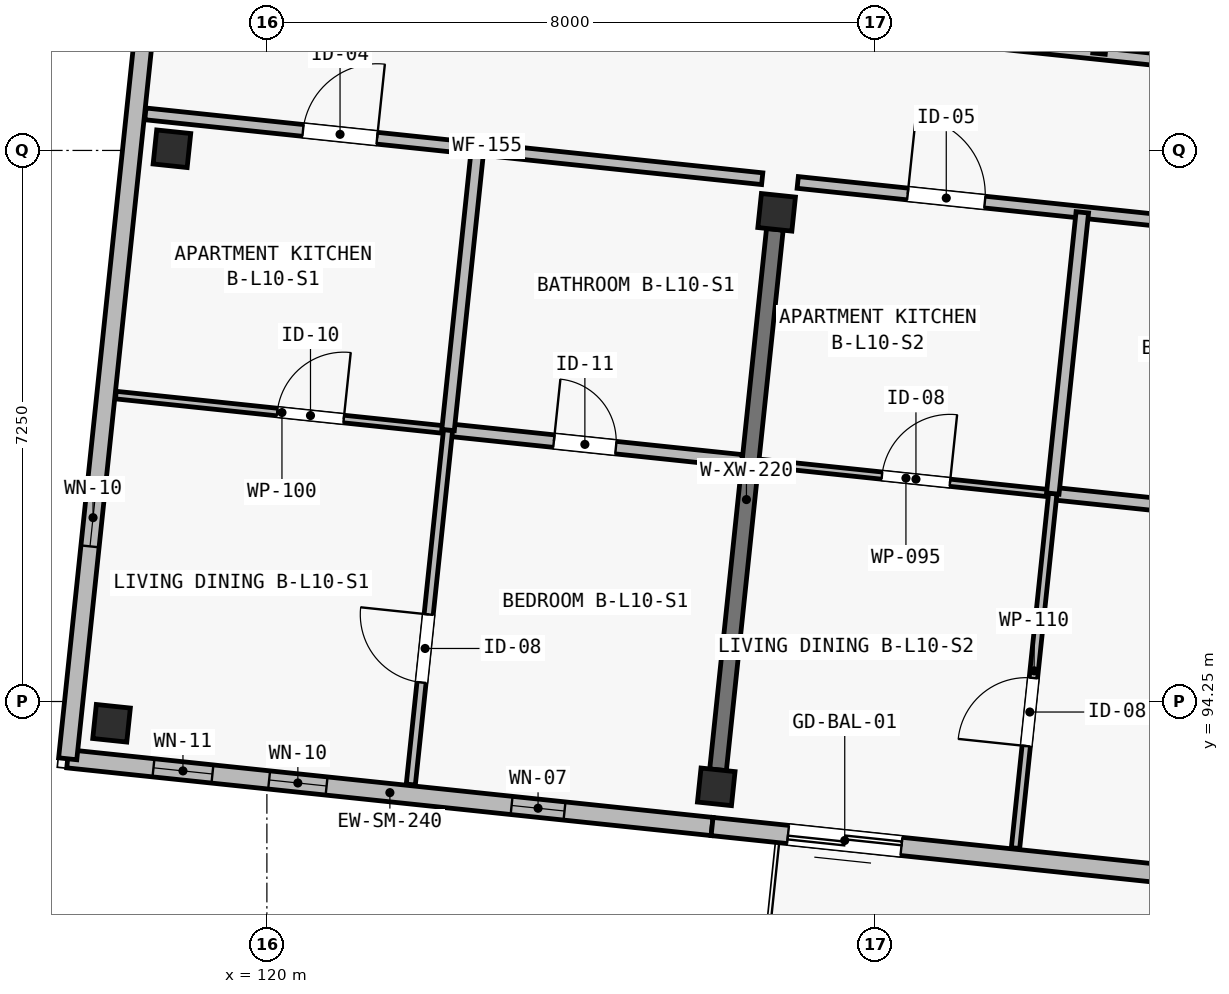
"""IFC4 building model, lengths in metres.
Left out: names, types, materials, properties, quantities, classifications, styles, units other than length and angle.
Written with IfcOpenShell. Run it as: python <this file> out.ifc"""

import sys

from ifc_helpers import new_model, si_unit, direction, frame, frame_2d, origin, origin_2d, place, context, subcontext, project, spatial, polyline, rectangle, outline, extrude, element, fill, save


model = new_model("IFC4")
c1 = context("Model", 3, precision=1e-05, world=origin(), true_north=direction((0.0, 1.0)))
c2 = subcontext(c1, "Body", "Model", "MODEL_VIEW")
j1 = project(units=[si_unit("LENGTHUNIT", "METRE"), si_unit("PLANEANGLEUNIT", "RADIAN")], contexts=[c1])
p1 = place(None, origin())
s1 = spatial("IfcSite", under=j1, at=p1, CompositionType="ELEMENT")
p2 = place(p1, origin())
s2 = spatial("IfcBuilding", under=s1, at=p2, CompositionType="ELEMENT")
p3 = place(p2, frame((0.0, 0.0, 34.4)))
s3 = spatial("IfcBuildingStorey", under=s2, at=p3, CompositionType="ELEMENT", Elevation=34.4)
for number, where, z_axis, x_axis in (
    (1, (117.956, 93.964, 0.0), (0.0, 0.0, 1.0), (0.995, -0.105, 0.0)),
    (2, (118.75, 101.522, 0.0), (0.0, 0.0, 1.0), (0.995, -0.105, 0.0)),
    (3, (125.912, 93.127, 0.0), (0.0, 0.0, 1.0), (0.995, -0.105, 0.0)),
    (4, (126.707, 100.686, 0.0), (0.0, 0.0, 1.0), (0.995, -0.105, 0.0)),
):
    element("IfcColumn", number, at=place(p3, frame(where, z_axis=z_axis, x_axis=x_axis)), inside=s3, PredefinedType="COLUMN", context=c2, shape_type="SweptSolid", body=[
        extrude(rectangle(XDim=0.45, YDim=0.45, at=origin_2d()), origin(), (0.0, 0.0, 1.0), 3.25),
    ])
p4 = place(p3, frame((125.936, 93.351, 0.0), z_axis=(0.0, 0.0, 1.0), x_axis=(0.104553253602, 0.994519289487, 0.0)))
e5 = element("IfcWall", 5, at=p4, inside=s3, PredefinedType="SHEAR", context=c2, shape_type="SweptSolid", body=[
    extrude(rectangle(XDim=7.15, YDim=0.22, at=frame_2d((3.575, 0.0))), origin(), (0.0, 0.0, 1.0), 2.5),
])
p5 = place(p3, frame((125.857, 92.605, 0.0), z_axis=(0.0, 0.0, 1.0), x_axis=(-0.994521760736, 0.104529744196, 0.0)))
e6 = element("IfcWall", 6, at=p5, inside=s3, PredefinedType="SOLIDWALL", context=c2, shape_type="SweptSolid", body=[
    extrude(outline(polyline([(0.0, 0.0), (8.525, 0.0), (8.525, 3.319), (0.0, 4.901), (0.0, 0.0)])), frame((0.0, 0.12, 0.0), z_axis=(0.0, -1.0, 0.0), x_axis=(1.0, 0.0, 0.0)), (0.0, 0.0, 1.0), 0.24),
])
p6 = place(p5, frame((1.952, 0.0, 0.52)))
e7 = element("IfcOpeningElement", 7, at=p6, cuts=e6, PredefinedType="OPENING", context=c2, shape_type="SweptSolid", body=[
    extrude(rectangle(XDim=0.7, YDim=2.36, at=frame_2d((0.35, 1.18))), frame((0.0, 0.135, 0.0), z_axis=(0.0, -1.0, 0.0), x_axis=(1.0, 0.0, 0.0)), (0.0, 0.0, 1.0), 0.27),
])
p7 = place(p5, frame((5.1, 0.0, 0.52)))
e8 = element("IfcOpeningElement", 8, at=p7, cuts=e6, PredefinedType="OPENING", context=c2, shape_type="SweptSolid", body=[
    extrude(rectangle(XDim=0.76, YDim=2.34, at=frame_2d((0.38, 1.17))), frame((0.0, 0.135, 0.0), z_axis=(0.0, -1.0, 0.0), x_axis=(1.0, 0.0, 0.0)), (0.0, 0.0, 1.0), 0.27),
])
p8 = place(p5, frame((6.61, 0.0, 0.42)))
e9 = element("IfcOpeningElement", 9, at=p8, cuts=e6, PredefinedType="OPENING", context=c2, shape_type="SweptSolid", body=[
    extrude(rectangle(XDim=0.78, YDim=2.2, at=frame_2d((0.39, 1.1))), frame((0.0, 0.135, 0.0), z_axis=(0.0, -1.0, 0.0), x_axis=(1.0, 0.0, 0.0)), (0.0, 0.0, 1.0), 0.27),
])
p9 = place(p3, frame((133.292, 91.824, 0.0), z_axis=(0.0, 0.0, 1.0), x_axis=(-0.994519939392, 0.104547071461, 0.0)))
e10 = element("IfcWall", 10, at=p9, inside=s3, PredefinedType="SOLIDWALL", context=c2, shape_type="SweptSolid", body=[
    extrude(outline(polyline([(0.0, 0.0), (7.475, 0.0), (7.475, 4.901), (0.0, 6.288), (0.0, 0.0)])), frame((0.0, 0.12, 0.0), z_axis=(0.0, -1.0, 0.0), x_axis=(1.0, 0.0, 0.0)), (0.0, 0.0, 1.0), 0.24),
])
p10 = place(p9, frame((4.97, 0.0, 0.0)))
e11 = element("IfcOpeningElement", 11, at=p10, cuts=e10, PredefinedType="OPENING", context=c2, shape_type="SweptSolid", body=[
    extrude(rectangle(XDim=1.5, YDim=2.12, at=frame_2d((0.75, 1.06))), frame((0.0, 0.135, 0.0), z_axis=(0.0, -1.0, 0.0), x_axis=(1.0, 0.0, 0.0)), (0.0, 0.0, 1.0), 0.27),
])
p11 = place(p9, frame((0.305, 0.0, 0.42)))
e12 = element("IfcOpeningElement", 12, at=p11, cuts=e10, PredefinedType="OPENING", context=c2, shape_type="SweptSolid", body=[
    extrude(rectangle(XDim=0.62, YDim=2.28, at=frame_2d((0.31, 1.14))), frame((0.0, 0.135, 0.0), z_axis=(0.0, -1.0, 0.0), x_axis=(1.0, 0.0, 0.0)), (0.0, 0.0, 1.0), 0.27),
])
p12 = place(p3, frame((117.379, 93.497, 0.0), z_axis=(0.0, 0.0, 1.0), x_axis=(0.1045253859, 0.994522218808, 0.0)))
e13 = element("IfcWall", 13, at=p12, inside=s3, PredefinedType="SOLIDWALL", context=c2, shape_type="SweptSolid", body=[
    extrude(rectangle(XDim=20.65, YDim=0.24, at=frame_2d((10.325, 0.0))), origin(), (0.0, 0.0, 1.0), 3.319),
])
p13 = place(p12, frame((2.81, 0.0, 0.45)))
e14 = element("IfcOpeningElement", 14, at=p13, cuts=e13, PredefinedType="OPENING", context=c2, shape_type="SweptSolid", body=[
    extrude(rectangle(XDim=0.76, YDim=2.34, at=frame_2d((0.38, 1.17))), frame((0.0, 0.135, 0.0), z_axis=(0.0, -1.0, 0.0), x_axis=(1.0, 0.0, 0.0)), (0.0, 0.0, 1.0), 0.27),
])
p14 = place(p12, frame((17.24, 0.0, 0.52)))
e15 = element("IfcOpeningElement", 15, at=p14, cuts=e13, PredefinedType="OPENING", context=c2, shape_type="SweptSolid", body=[
    extrude(rectangle(XDim=0.6, YDim=2.22, at=frame_2d((0.3, 1.11))), frame((0.0, 0.135, 0.0), z_axis=(0.0, -1.0, 0.0), x_axis=(1.0, 0.0, 0.0)), (0.0, 0.0, 1.0), 0.27),
])
p15 = place(p3, frame((118.402, 101.981, 0.0), z_axis=(0.0, 0.0, 1.0), x_axis=(0.994520852686, -0.104538383252, 0.0)))
e16 = element("IfcWall", 16, at=p15, inside=s3, PredefinedType="PARTITIONING", context=c2, shape_type="SweptSolid", body=[
    extrude(rectangle(XDim=8.16, YDim=0.155, at=frame_2d((4.08, 0.0))), origin(), (0.0, 0.0, 1.0), 3.15),
])
p16 = place(p15, frame((2.085, 0.0, 0.0)))
e17 = element("IfcOpeningElement", 17, at=p16, cuts=e16, PredefinedType="OPENING", context=c2, shape_type="SweptSolid", body=[
    extrude(rectangle(XDim=0.98, YDim=2.15, at=frame_2d((0.49, 1.075))), frame((0.0, 0.093, 0.0), z_axis=(0.0, -1.0, 0.0), x_axis=(1.0, 0.0, 0.0)), (0.0, 0.0, 1.0), 0.185),
])
p17 = place(p3, frame((118.013, 98.281, 0.0), z_axis=(0.0, 0.0, 1.0), x_axis=(0.994520660879, -0.104540207986, 0.0)))
e18 = element("IfcWall", 18, at=p17, inside=s3, PredefinedType="PARTITIONING", context=c2, shape_type="SweptSolid", body=[
    extrude(rectangle(XDim=4.395, YDim=0.1, at=frame_2d((2.198, 0.0))), origin(), (0.0, 0.0, 1.0), 3.15),
])
p18 = place(p17, frame((2.135, 0.0, 0.0)))
e19 = element("IfcOpeningElement", 19, at=p18, cuts=e18, PredefinedType="OPENING", context=c2, shape_type="SweptSolid", body=[
    extrude(rectangle(XDim=0.88, YDim=2.1, at=frame_2d((0.44, 1.05))), frame((0.0, 0.065, 0.0), z_axis=(0.0, -1.0, 0.0), x_axis=(1.0, 0.0, 0.0)), (0.0, 0.0, 1.0), 0.13),
])
p19 = place(p3, frame((122.384, 97.822, 0.0), z_axis=(0.0, 0.0, 1.0), x_axis=(0.994524375082, -0.104504867671, 0.0)))
e20 = element("IfcWall", 20, at=p19, inside=s3, PredefinedType="PLUMBINGWALL", context=c2, shape_type="SweptSolid", body=[
    extrude(rectangle(XDim=3.885, YDim=0.165, at=frame_2d((1.942, 0.0))), origin(), (0.0, 0.0, 1.0), 3.15),
])
p20 = place(p19, frame((1.4, 0.0, 0.0)))
e21 = element("IfcOpeningElement", 21, at=p20, cuts=e20, PredefinedType="OPENING", context=c2, shape_type="SweptSolid", body=[
    extrude(rectangle(XDim=0.82, YDim=2.08, at=frame_2d((0.41, 1.04))), frame((0.0, 0.097, 0.0), z_axis=(0.0, -1.0, 0.0), x_axis=(1.0, 0.0, 0.0)), (0.0, 0.0, 1.0), 0.195),
])
p21 = place(p3, frame((121.894, 93.158, 0.0), z_axis=(0.0, 0.0, 1.0), x_axis=(0.104527618124, 0.994521984196, 0.0)))
e22 = element("IfcWall", 22, at=p21, inside=s3, PredefinedType="PARTITIONING", context=c2, shape_type="SweptSolid", body=[
    extrude(rectangle(XDim=4.69, YDim=0.12, at=frame_2d((2.345, 0.0))), origin(), (0.0, 0.0, 1.0), 3.15),
])
p22 = place(p21, frame((1.35, 0.0, 0.0)))
e23 = element("IfcOpeningElement", 23, at=p22, cuts=e22, PredefinedType="OPENING", context=c2, shape_type="SweptSolid", body=[
    extrude(rectangle(XDim=0.9, YDim=2.1, at=frame_2d((0.45, 1.05))), frame((0.0, 0.075, 0.0), z_axis=(0.0, -1.0, 0.0), x_axis=(1.0, 0.0, 0.0)), (0.0, 0.0, 1.0), 0.15),
])
p23 = place(p3, frame((122.384, 97.822, 0.0), z_axis=(0.0, 0.0, 1.0), x_axis=(0.10447980711, 0.994527008133, 0.0)))
e24 = element("IfcWall", 24, at=p23, inside=s3, PredefinedType="PLUMBINGWALL", context=c2, shape_type="SweptSolid", body=[
    extrude(rectangle(XDim=3.72, YDim=0.165, at=frame_2d((1.86, 0.0))), origin(), (0.0, 0.0, 1.0), 3.15),
])
p24 = place(p3, frame((126.984, 101.079, 0.0), z_axis=(0.0, 0.0, 1.0), x_axis=(0.994521785195, -0.104529511491, 0.0)))
e25 = element("IfcWall", 25, at=p24, inside=s3, PredefinedType="PARTITIONING", context=c2, shape_type="SweptSolid", body=[
    extrude(rectangle(XDim=7.53, YDim=0.155, at=frame_2d((3.765, 0.0))), origin(), (0.0, 0.0, 1.0), 2.97),
])
p25 = place(p24, frame((1.455, 0.0, 0.0)))
e26 = element("IfcOpeningElement", 26, at=p25, cuts=e25, PredefinedType="OPENING", context=c2, shape_type="SweptSolid", body=[
    extrude(rectangle(XDim=1.02, YDim=2.2, at=frame_2d((0.51, 1.1))), frame((0.0, 0.093, 0.0), z_axis=(0.0, -1.0, 0.0), x_axis=(1.0, 0.0, 0.0)), (0.0, 0.0, 1.0), 0.185),
])
p26 = place(p3, frame((126.476, 97.392, 0.0), z_axis=(0.0, 0.0, 1.0), x_axis=(0.994517841934, -0.104567021925, 0.0)))
e27 = element("IfcWall", 27, at=p26, inside=s3, PredefinedType="PARTITIONING", context=c2, shape_type="SweptSolid", body=[
    extrude(rectangle(XDim=3.885, YDim=0.095, at=frame_2d((1.942, 0.0))), origin(), (0.0, 0.0, 1.0), 2.97),
])
p27 = place(p26, frame((1.625, 0.0, 0.0)))
e28 = element("IfcOpeningElement", 28, at=p27, cuts=e27, PredefinedType="OPENING", context=c2, shape_type="SweptSolid", body=[
    extrude(rectangle(XDim=0.9, YDim=2.1, at=frame_2d((0.45, 1.05))), frame((0.0, 0.062, 0.0), z_axis=(0.0, -1.0, 0.0), x_axis=(1.0, 0.0, 0.0)), (0.0, 0.0, 1.0), 0.125),
])
p28 = place(p3, frame((130.34, 96.986, 0.0), z_axis=(0.0, 0.0, 1.0), x_axis=(0.994524375082, -0.104504867671, 0.0)))
e29 = element("IfcWall", 29, at=p28, inside=s3, PredefinedType="PLUMBINGWALL", context=c2, shape_type="SweptSolid", body=[
    extrude(rectangle(XDim=3.885, YDim=0.165, at=frame_2d((1.942, 0.0))), origin(), (0.0, 0.0, 1.0), 2.97),
])
p29 = place(p28, frame((1.4, 0.0, 0.0)))
e30 = element("IfcOpeningElement", 30, at=p29, cuts=e29, PredefinedType="OPENING", context=c2, shape_type="SweptSolid", body=[
    extrude(rectangle(XDim=0.82, YDim=2.08, at=frame_2d((0.41, 1.04))), frame((0.0, 0.097, 0.0), z_axis=(0.0, -1.0, 0.0), x_axis=(1.0, 0.0, 0.0)), (0.0, 0.0, 1.0), 0.195),
])
p30 = place(p3, frame((129.85, 92.322, 0.0), z_axis=(0.0, 0.0, 1.0), x_axis=(0.104527618124, 0.994521984196, 0.0)))
e31 = element("IfcWall", 31, at=p30, inside=s3, PredefinedType="PARTITIONING", context=c2, shape_type="SweptSolid", body=[
    extrude(rectangle(XDim=4.69, YDim=0.11, at=frame_2d((2.345, 0.0))), origin(), (0.0, 0.0, 1.0), 2.97),
])
p31 = place(p30, frame((1.35, 0.0, 0.0)))
e32 = element("IfcOpeningElement", 32, at=p31, cuts=e31, PredefinedType="OPENING", context=c2, shape_type="SweptSolid", body=[
    extrude(rectangle(XDim=0.9, YDim=2.1, at=frame_2d((0.45, 1.05))), frame((0.0, 0.07, 0.0), z_axis=(0.0, -1.0, 0.0), x_axis=(1.0, 0.0, 0.0)), (0.0, 0.0, 1.0), 0.14),
])
p32 = place(p3, frame((130.34, 96.986, 0.0), z_axis=(0.0, 0.0, 1.0), x_axis=(0.104544718065, 0.994520186786, 0.0)))
e33 = element("IfcWall", 33, at=p32, inside=s3, PredefinedType="PLUMBINGWALL", context=c2, shape_type="SweptSolid", body=[
    extrude(rectangle(XDim=3.72, YDim=0.165, at=frame_2d((1.86, 0.0))), origin(), (0.0, 0.0, 1.0), 2.97),
])
p33 = place(p3, frame((127.358, 103.151, 0.0), z_axis=(0.0, 0.0, 1.0), x_axis=(0.994522671024, -0.104521083137, 0.0)))
e34 = element("IfcWall", 34, at=p33, inside=s3, PredefinedType="PARTITIONING", context=c2, shape_type="SweptSolid", body=[
    extrude(rectangle(XDim=7.22, YDim=0.155, at=frame_2d((3.61, 0.0))), origin(), (0.0, 0.0, 1.0), 2.97),
])
p34 = place(p33, frame((1.305, 0.0, 0.0)))
e35 = element("IfcOpeningElement", 35, at=p34, cuts=e34, PredefinedType="OPENING", context=c2, shape_type="SweptSolid", body=[
    extrude(rectangle(XDim=1.02, YDim=2.2, at=frame_2d((0.51, 1.1))), frame((0.0, 0.093, 0.0), z_axis=(0.0, -1.0, 0.0), x_axis=(1.0, 0.0, 0.0)), (0.0, 0.0, 1.0), 0.185),
])
p35 = place(p3, frame((130.948, 102.774, 0.0), z_axis=(0.0, 0.0, 1.0), x_axis=(0.104537578263, 0.994520937301, 0.0)))
e36 = element("IfcWall", 36, at=p35, inside=s3, PredefinedType="PLUMBINGWALL", context=c2, shape_type="SweptSolid", body=[
    extrude(rectangle(XDim=5.18, YDim=0.165, at=frame_2d((2.59, 0.0))), origin(), (0.0, 0.0, 1.0), 2.97),
])
p36 = place(p6, origin())
e37 = element("IfcWindow", 37, at=p36, inside=s3, PartitioningType="SINGLE_PANEL", PredefinedType="WINDOW", context=c2, shape_type="SweptSolid", body=[
    extrude(rectangle(XDim=0.7, YDim=2.36, at=frame_2d((0.35, 1.18))), frame((0.0, 0.03, 0.0), z_axis=(0.0, -1.0, 0.0), x_axis=(1.0, 0.0, 0.0)), (0.0, 0.0, 1.0), 0.06),
])
fill(e7, e37)
p37 = place(p7, origin())
e38 = element("IfcWindow", 38, at=p37, inside=s3, PartitioningType="SINGLE_PANEL", PredefinedType="WINDOW", context=c2, shape_type="SweptSolid", body=[
    extrude(rectangle(XDim=0.76, YDim=2.34, at=frame_2d((0.38, 1.17))), frame((0.0, 0.03, 0.0), z_axis=(0.0, -1.0, 0.0), x_axis=(1.0, 0.0, 0.0)), (0.0, 0.0, 1.0), 0.06),
])
fill(e8, e38)
p38 = place(p8, origin())
e39 = element("IfcWindow", 39, at=p38, inside=s3, PartitioningType="SINGLE_PANEL", PredefinedType="WINDOW", context=c2, shape_type="SweptSolid", body=[
    extrude(rectangle(XDim=0.78, YDim=2.2, at=frame_2d((0.39, 1.1))), frame((0.0, 0.03, 0.0), z_axis=(0.0, -1.0, 0.0), x_axis=(1.0, 0.0, 0.0)), (0.0, 0.0, 1.0), 0.06),
])
fill(e9, e39)
p39 = place(p10, origin())
e40 = element("IfcDoor", 40, at=p39, inside=s3, OperationType="SLIDING_TO_RIGHT", PredefinedType="DOOR", context=c2, shape_type="SweptSolid", body=[
    extrude(rectangle(XDim=1.5, YDim=2.12, at=frame_2d((0.75, 1.06))), frame((0.0, 0.025, 0.0), z_axis=(0.0, -1.0, 0.0), x_axis=(1.0, 0.0, 0.0)), (0.0, 0.0, 1.0), 0.05),
])
fill(e11, e40)
p40 = place(p13, origin())
e41 = element("IfcWindow", 41, at=p40, inside=s3, PartitioningType="SINGLE_PANEL", PredefinedType="WINDOW", context=c2, shape_type="SweptSolid", body=[
    extrude(rectangle(XDim=0.76, YDim=2.34, at=frame_2d((0.38, 1.17))), frame((0.0, 0.03, 0.0), z_axis=(0.0, -1.0, 0.0), x_axis=(1.0, 0.0, 0.0)), (0.0, 0.0, 1.0), 0.06),
])
fill(e14, e41)
p41 = place(p16, origin())
e42 = element("IfcDoor", 42, at=p41, inside=s3, OperationType="SINGLE_SWING_RIGHT", PredefinedType="DOOR", context=c2, shape_type="SweptSolid", body=[
    extrude(rectangle(XDim=0.98, YDim=2.15, at=frame_2d((0.49, 1.075))), frame((0.0, 0.025, 0.0), z_axis=(0.0, -1.0, 0.0), x_axis=(1.0, 0.0, 0.0)), (0.0, 0.0, 1.0), 0.05),
])
fill(e17, e42)
p42 = place(p18, origin())
e43 = element("IfcDoor", 43, at=p42, inside=s3, OperationType="SINGLE_SWING_RIGHT", PredefinedType="DOOR", context=c2, shape_type="SweptSolid", body=[
    extrude(rectangle(XDim=0.88, YDim=2.1, at=frame_2d((0.44, 1.05))), frame((0.0, 0.025, 0.0), z_axis=(0.0, -1.0, 0.0), x_axis=(1.0, 0.0, 0.0)), (0.0, 0.0, 1.0), 0.05),
])
fill(e19, e43)
p43 = place(p20, origin())
e44 = element("IfcDoor", 44, at=p43, inside=s3, OperationType="SINGLE_SWING_LEFT", PredefinedType="DOOR", context=c2, shape_type="SweptSolid", body=[
    extrude(rectangle(XDim=0.82, YDim=2.08, at=frame_2d((0.41, 1.04))), frame((0.0, 0.025, 0.0), z_axis=(0.0, -1.0, 0.0), x_axis=(1.0, 0.0, 0.0)), (0.0, 0.0, 1.0), 0.05),
])
fill(e21, e44)
p44 = place(p22, origin())
e45 = element("IfcDoor", 45, at=p44, inside=s3, OperationType="SINGLE_SWING_RIGHT", PredefinedType="DOOR", context=c2, shape_type="SweptSolid", body=[
    extrude(rectangle(XDim=0.9, YDim=2.1, at=frame_2d((0.45, 1.05))), frame((0.0, 0.025, 0.0), z_axis=(0.0, -1.0, 0.0), x_axis=(1.0, 0.0, 0.0)), (0.0, 0.0, 1.0), 0.05),
])
fill(e23, e45)
p45 = place(p25, origin())
e46 = element("IfcDoor", 46, at=p45, inside=s3, OperationType="SINGLE_SWING_LEFT", PredefinedType="DOOR", context=c2, shape_type="SweptSolid", body=[
    extrude(rectangle(XDim=1.02, YDim=2.2, at=frame_2d((0.51, 1.1))), frame((0.0, 0.025, 0.0), z_axis=(0.0, -1.0, 0.0), x_axis=(1.0, 0.0, 0.0)), (0.0, 0.0, 1.0), 0.05),
])
fill(e26, e46)
p46 = place(p27, origin())
e47 = element("IfcDoor", 47, at=p46, inside=s3, OperationType="SINGLE_SWING_RIGHT", PredefinedType="DOOR", context=c2, shape_type="SweptSolid", body=[
    extrude(rectangle(XDim=0.9, YDim=2.1, at=frame_2d((0.45, 1.05))), frame((0.0, 0.025, 0.0), z_axis=(0.0, -1.0, 0.0), x_axis=(1.0, 0.0, 0.0)), (0.0, 0.0, 1.0), 0.05),
])
fill(e28, e47)
p47 = place(p31, origin())
e48 = element("IfcDoor", 48, at=p47, inside=s3, OperationType="SINGLE_SWING_LEFT", PredefinedType="DOOR", context=c2, shape_type="SweptSolid", body=[
    extrude(rectangle(XDim=0.9, YDim=2.1, at=frame_2d((0.45, 1.05))), frame((0.0, 0.025, 0.0), z_axis=(0.0, -1.0, 0.0), x_axis=(1.0, 0.0, 0.0)), (0.0, 0.0, 1.0), 0.05),
])
fill(e32, e48)
save(model, sys.argv[1])
